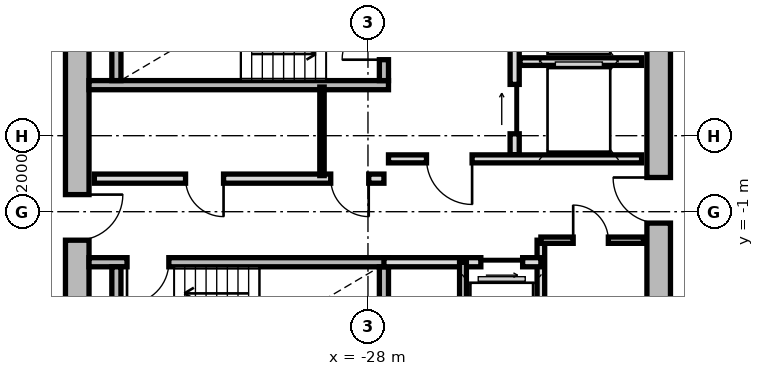
"""IFC4 building model, lengths in metres.
Left out: names, types, materials, properties, quantities, classifications, styles, units other than length and angle.
Written with IfcOpenShell. Run it as: python <this file> out.ifc"""

import sys

from ifc_helpers import new_model, si_unit, direction, frame, frame_2d, origin, place, context, subcontext, project, spatial, rectangle, extrude, source, transform, mapped, element, fill, save


model = new_model("IFC4")
c1 = context("Model", 3, precision=1e-05, world=origin(), true_north=direction((0.0, 1.0)))
c2 = subcontext(c1, "Body", "Model", "MODEL_VIEW")
j1 = project(units=[si_unit("LENGTHUNIT", "METRE"), si_unit("PLANEANGLEUNIT", "RADIAN")], contexts=[c1])
p1 = place(None, origin())
s1 = spatial("IfcSite", under=j1, at=p1, CompositionType="ELEMENT")
p2 = place(p1, origin())
s2 = spatial("IfcBuilding", under=s1, at=p2, CompositionType="ELEMENT")
p3 = place(p2, frame((0.0, 0.0, 158.7)))
s3 = spatial("IfcBuildingStorey", under=s2, at=p3, CompositionType="ELEMENT", Elevation=158.7)
m1 = source(origin(), c2, "Body", "SweptSolid", [
    extrude(rectangle(XDim=11.1, YDim=0.62, at=frame_2d((5.55, 0.0))), origin(), (0.0, 0.0, 1.0), 2.81),
])
p4 = place(p3, frame((-35.65, -5.55, 0.0), z_axis=(0.0, 0.0, 1.0), x_axis=(0.0, 1.0, 0.0)))
e1 = element("IfcWall", 1, at=p4, inside=s3, PredefinedType="SHEAR", context=c2, shape_type="MappedRepresentation", body=[
    mapped(m1, transform((0.0, 0.0, 0.0), x_axis=(1.0, 0.0, 0.0), y_axis=(0.0, 1.0, 0.0), z_axis=(0.0, 0.0, 1.0), scale=1.0)),
])
p5 = place(p4, frame((3.8, 0.0, 0.0)))
e2 = element("IfcOpeningElement", 2, at=p5, cuts=e1, PredefinedType="OPENING", context=c2, shape_type="SweptSolid", body=[
    extrude(rectangle(XDim=1.2, YDim=2.15, at=frame_2d((0.6, 1.075))), frame((0.0, 0.32, 0.0), z_axis=(0.0, -1.0, 0.0), x_axis=(1.0, 0.0, 0.0)), (0.0, 0.0, 1.0), 0.64),
])
p6 = place(p3, frame((-20.35, 5.55, 0.0), z_axis=(0.0, 0.0, 1.0), x_axis=(0.0, -1.0, 0.0)))
e3 = element("IfcWall", 3, at=p6, inside=s3, PredefinedType="SHEAR", context=c2, shape_type="MappedRepresentation", body=[
    mapped(m1, transform((0.0, 0.0, 0.0), x_axis=(1.0, 0.0, 0.0), y_axis=(0.0, 1.0, 0.0), z_axis=(0.0, 0.0, 1.0), scale=1.0)),
])
p7 = place(p6, frame((5.65, 0.0, 0.0)))
e4 = element("IfcOpeningElement", 4, at=p7, cuts=e3, PredefinedType="OPENING", context=c2, shape_type="SweptSolid", body=[
    extrude(rectangle(XDim=1.2, YDim=2.15, at=frame_2d((0.6, 1.075))), frame((0.0, 0.32, 0.0), z_axis=(0.0, -1.0, 0.0), x_axis=(1.0, 0.0, 0.0)), (0.0, 0.0, 1.0), 0.64),
])
m2 = source(origin(), c2, "Body", "SweptSolid", [
    extrude(rectangle(XDim=7.88, YDim=0.24, at=frame_2d((3.94, 0.0))), origin(), (0.0, 0.0, 1.0), 2.81),
])
p8 = place(p3, frame((-35.34, 2.33, 0.0), z_axis=(0.0, 0.0, 1.0), x_axis=(1.0, 0.0, 0.0)))
e5 = element("IfcWall", 5, at=p8, inside=s3, PredefinedType="PARTITIONING", context=c2, shape_type="MappedRepresentation", body=[
    mapped(m2, transform((0.0, 0.0, 0.0), x_axis=(1.0, 0.0, 0.0), y_axis=(0.0, 1.0, 0.0), z_axis=(0.0, 0.0, 1.0), scale=1.0)),
])
m3 = source(origin(), c2, "Body", "SweptSolid", [
    extrude(rectangle(XDim=3.19, YDim=0.24, at=frame_2d((1.595, 0.0))), origin(), (0.0, 0.0, 1.0), 2.81),
])
p9 = place(p3, frame((-34.62, 2.45, 0.0), z_axis=(0.0, 0.0, 1.0), x_axis=(0.0, 1.0, 0.0)))
e6 = element("IfcWall", 6, at=p9, inside=s3, PredefinedType="PARTITIONING", context=c2, shape_type="MappedRepresentation", body=[
    mapped(m3, transform((0.0, 0.0, 0.0), x_axis=(1.0, 0.0, 0.0), y_axis=(0.0, 1.0, 0.0), z_axis=(0.0, 0.0, 1.0), scale=1.0)),
])
p10 = place(p3, frame((-27.58, 2.45, 0.0), z_axis=(0.0, 0.0, 1.0), x_axis=(0.0, 1.0, 0.0)))
e7 = element("IfcWall", 7, at=p10, inside=s3, PredefinedType="PARTITIONING", context=c2, shape_type="MappedRepresentation", body=[
    mapped(m3, transform((0.0, 0.0, 0.0), x_axis=(1.0, 0.0, 0.0), y_axis=(0.0, 1.0, 0.0), z_axis=(0.0, 0.0, 1.0), scale=1.0)),
])
p11 = place(p10, frame((0.55, 0.0, 0.0)))
e8 = element("IfcOpeningElement", 8, at=p11, cuts=e7, PredefinedType="OPENING", context=c2, shape_type="SweptSolid", body=[
    extrude(rectangle(XDim=1.1, YDim=2.15, at=frame_2d((0.55, 1.075))), frame((0.0, 0.13, 0.0), z_axis=(0.0, -1.0, 0.0), x_axis=(1.0, 0.0, 0.0)), (0.0, 0.0, 1.0), 0.26),
])
p12 = place(p3, frame((-35.34, -2.33, 0.0), z_axis=(0.0, 0.0, 1.0), x_axis=(1.0, 0.0, 0.0)))
e9 = element("IfcWall", 9, at=p12, inside=s3, PredefinedType="PARTITIONING", context=c2, shape_type="MappedRepresentation", body=[
    mapped(m2, transform((0.0, 0.0, 0.0), x_axis=(1.0, 0.0, 0.0), y_axis=(0.0, 1.0, 0.0), z_axis=(0.0, 0.0, 1.0), scale=1.0)),
])
p13 = place(p12, frame((1.0, 0.0, 0.0)))
e10 = element("IfcOpeningElement", 10, at=p13, cuts=e9, PredefinedType="OPENING", context=c2, shape_type="SweptSolid", body=[
    extrude(rectangle(XDim=1.1, YDim=2.15, at=frame_2d((0.55, 1.075))), frame((0.0, 0.13, 0.0), z_axis=(0.0, -1.0, 0.0), x_axis=(1.0, 0.0, 0.0)), (0.0, 0.0, 1.0), 0.26),
])
for number, where, z_axis, x_axis in (
    (11, (-34.62, -5.64, 0.0), (0.0, 0.0, 1.0), (0.0, 1.0, 0.0)),
    (12, (-27.58, -5.64, 0.0), (0.0, 0.0, 1.0), (0.0, 1.0, 0.0)),
):
    element("IfcWall", number, at=place(p3, frame(where, z_axis=z_axis, x_axis=x_axis)), inside=s3, PredefinedType="PARTITIONING", context=c2, shape_type="MappedRepresentation", body=[
        mapped(m3, transform((0.0, 0.0, 0.0), x_axis=(1.0, 0.0, 0.0), y_axis=(0.0, 1.0, 0.0), z_axis=(0.0, 0.0, 1.0), scale=1.0)),
    ])
m4 = source(origin(), c2, "Body", "SweptSolid", [
    extrude(rectangle(XDim=5.0, YDim=0.24, at=frame_2d((2.5, 0.0))), origin(), (0.0, 0.0, 1.0), 2.795),
])
p14 = place(p3, frame((-24.14, 0.5, 0.0), z_axis=(0.0, 0.0, 1.0), x_axis=(0.0, 1.0, 0.0)))
e13 = element("IfcWall", 13, at=p14, inside=s3, PredefinedType="PARTITIONING", context=c2, shape_type="MappedRepresentation", body=[
    mapped(m4, transform((0.0, 0.0, 0.0), x_axis=(1.0, 0.0, 0.0), y_axis=(0.0, 1.0, 0.0), z_axis=(0.0, 0.0, 1.0), scale=1.0)),
])
p15 = place(p14, frame((3.05, 0.0, 0.0)))
e14 = element("IfcOpeningElement", 14, at=p15, cuts=e13, PredefinedType="OPENING", context=c2, shape_type="SweptSolid", body=[
    extrude(rectangle(XDim=1.3, YDim=2.2, at=frame_2d((0.65, 1.1))), frame((0.0, 0.13, 0.0), z_axis=(0.0, -1.0, 0.0), x_axis=(1.0, 0.0, 0.0)), (0.0, 0.0, 1.0), 0.26),
])
p16 = place(p14, frame((0.55, 0.0, 0.0)))
e15 = element("IfcOpeningElement", 15, at=p16, cuts=e13, PredefinedType="OPENING", context=c2, shape_type="SweptSolid", body=[
    extrude(rectangle(XDim=1.3, YDim=2.2, at=frame_2d((0.65, 1.1))), frame((0.0, 0.13, 0.0), z_axis=(0.0, -1.0, 0.0), x_axis=(1.0, 0.0, 0.0)), (0.0, 0.0, 1.0), 0.26),
])
m5 = source(origin(), c2, "Body", "SweptSolid", [
    extrude(rectangle(XDim=3.2, YDim=0.2, at=frame_2d((1.6, 0.0))), origin(), (0.0, 0.0, 1.0), 2.795),
])
p17 = place(p3, frame((-24.0, 2.95, 0.0), z_axis=(0.0, 0.0, 1.0), x_axis=(1.0, 0.0, 0.0)))
e16 = element("IfcWall", 16, at=p17, inside=s3, PredefinedType="PARTITIONING", context=c2, shape_type="MappedRepresentation", body=[
    mapped(m5, transform((0.0, 0.0, 0.0), x_axis=(1.0, 0.0, 0.0), y_axis=(0.0, 1.0, 0.0), z_axis=(0.0, 0.0, 1.0), scale=1.0)),
])
m6 = source(origin(), c2, "Body", "SweptSolid", [
    extrude(rectangle(XDim=6.66, YDim=0.21, at=frame_2d((3.33, 0.0))), origin(), (0.0, 0.0, 1.0), 2.795),
])
p18 = place(p3, frame((-27.46, 0.39, 0.0), z_axis=(0.0, 0.0, 1.0), x_axis=(1.0, 0.0, 0.0)))
e17 = element("IfcWall", 17, at=p18, inside=s3, PredefinedType="PARTITIONING", context=c2, shape_type="MappedRepresentation", body=[
    mapped(m6, transform((0.0, 0.0, 0.0), x_axis=(1.0, 0.0, 0.0), y_axis=(0.0, 1.0, 0.0), z_axis=(0.0, 0.0, 1.0), scale=1.0)),
])
p19 = place(p18, frame((1.0, 0.0, 0.0)))
e18 = element("IfcOpeningElement", 18, at=p19, cuts=e17, PredefinedType="OPENING", context=c2, shape_type="SweptSolid", body=[
    extrude(rectangle(XDim=1.2, YDim=2.15, at=frame_2d((0.6, 1.075))), frame((0.0, 0.115, 0.0), z_axis=(0.0, -1.0, 0.0), x_axis=(1.0, 0.0, 0.0)), (0.0, 0.0, 1.0), 0.23),
])
m7 = source(origin(), c2, "Body", "SweptSolid", [
    extrude(rectangle(XDim=7.62, YDim=0.24, at=frame_2d((3.81, 0.0))), origin(), (0.0, 0.0, 1.0), 2.795),
])
p20 = place(p3, frame((-35.2, -0.13, 0.0), z_axis=(0.0, 0.0, 1.0), x_axis=(1.0, 0.0, 0.0)))
e19 = element("IfcWall", 19, at=p20, inside=s3, PredefinedType="PARTITIONING", context=c2, shape_type="MappedRepresentation", body=[
    mapped(m7, transform((0.0, 0.0, 0.0), x_axis=(1.0, 0.0, 0.0), y_axis=(0.0, 1.0, 0.0), z_axis=(0.0, 0.0, 1.0), scale=1.0)),
])
p21 = place(p20, frame((6.22, 0.0, 0.0)))
e20 = element("IfcOpeningElement", 20, at=p21, cuts=e19, PredefinedType="OPENING", context=c2, shape_type="SweptSolid", body=[
    extrude(rectangle(XDim=1.0, YDim=2.1, at=frame_2d((0.5, 1.05))), frame((0.0, 0.13, 0.0), z_axis=(0.0, -1.0, 0.0), x_axis=(1.0, 0.0, 0.0)), (0.0, 0.0, 1.0), 0.26),
])
p22 = place(p20, frame((2.4, 0.0, 0.0)))
e21 = element("IfcOpeningElement", 21, at=p22, cuts=e19, PredefinedType="OPENING", context=c2, shape_type="SweptSolid", body=[
    extrude(rectangle(XDim=1.0, YDim=2.1, at=frame_2d((0.5, 1.05))), frame((0.0, 0.13, 0.0), z_axis=(0.0, -1.0, 0.0), x_axis=(1.0, 0.0, 0.0)), (0.0, 0.0, 1.0), 0.26),
])
m8 = source(origin(), c2, "Body", "SweptSolid", [
    extrude(rectangle(XDim=2.33, YDim=0.115, at=frame_2d((1.165, 0.0))), origin(), (0.0, 0.0, 1.0), 2.795),
])
p23 = place(p3, frame((-29.21, -0.05, 0.0), z_axis=(0.0, 0.0, 1.0), x_axis=(0.0, 1.0, 0.0)))
e22 = element("IfcWall", 22, at=p23, inside=s3, PredefinedType="PARTITIONING", context=c2, shape_type="MappedRepresentation", body=[
    mapped(m8, transform((0.0, 0.0, 0.0), x_axis=(1.0, 0.0, 0.0), y_axis=(0.0, 1.0, 0.0), z_axis=(0.0, 0.0, 1.0), scale=1.0)),
])
m9 = source(origin(), c2, "Body", "SweptSolid", [
    extrude(rectangle(XDim=3.8, YDim=0.2, at=frame_2d((1.9, 0.0))), origin(), (0.0, 0.0, 1.0), 2.795),
])
p24 = place(p3, frame((-23.45, -5.55, 0.0), z_axis=(0.0, 0.0, 1.0), x_axis=(0.0, 1.0, 0.0)))
e23 = element("IfcWall", 23, at=p24, inside=s3, PredefinedType="PARTITIONING", context=c2, shape_type="MappedRepresentation", body=[
    mapped(m9, transform((0.0, 0.0, 0.0), x_axis=(1.0, 0.0, 0.0), y_axis=(0.0, 1.0, 0.0), z_axis=(0.0, 0.0, 1.0), scale=1.0)),
])
m10 = source(origin(), c2, "Body", "SweptSolid", [
    extrude(rectangle(XDim=4.13, YDim=0.24, at=frame_2d((2.065, 0.0))), origin(), (0.0, 0.0, 1.0), 2.795),
])
p25 = place(p3, frame((-27.58, -2.33, 0.0), z_axis=(0.0, 0.0, 1.0), x_axis=(1.0, 0.0, 0.0)))
e24 = element("IfcWall", 24, at=p25, inside=s3, PredefinedType="PARTITIONING", context=c2, shape_type="MappedRepresentation", body=[
    mapped(m10, transform((0.0, 0.0, 0.0), x_axis=(1.0, 0.0, 0.0), y_axis=(0.0, 1.0, 0.0), z_axis=(0.0, 0.0, 1.0), scale=1.0)),
])
p26 = place(p25, frame((2.55, 0.0, 0.0)))
e25 = element("IfcOpeningElement", 25, at=p26, cuts=e24, PredefinedType="OPENING", context=c2, shape_type="SweptSolid", body=[
    extrude(rectangle(XDim=1.1, YDim=2.2, at=frame_2d((0.55, 1.1))), frame((0.0, 0.13, 0.0), z_axis=(0.0, -1.0, 0.0), x_axis=(1.0, 0.0, 0.0)), (0.0, 0.0, 1.0), 0.26),
])
m11 = source(origin(), c2, "Body", "SweptSolid", [
    extrude(rectangle(XDim=3.22, YDim=0.18, at=frame_2d((1.61, 0.0))), origin(), (0.0, 0.0, 1.0), 2.795),
])
p27 = place(p3, frame((-25.5, -5.55, 0.0), z_axis=(0.0, 0.0, 1.0), x_axis=(0.0, 1.0, 0.0)))
e26 = element("IfcWall", 26, at=p27, inside=s3, PredefinedType="PARTITIONING", context=c2, shape_type="MappedRepresentation", body=[
    mapped(m11, transform((0.0, 0.0, 0.0), x_axis=(1.0, 0.0, 0.0), y_axis=(0.0, 1.0, 0.0), z_axis=(0.0, 0.0, 1.0), scale=1.0)),
])
m12 = source(origin(), c2, "Body", "SweptSolid", [
    extrude(rectangle(XDim=2.7, YDim=0.165, at=frame_2d((1.35, 0.0))), origin(), (0.0, 0.0, 1.0), 2.795),
])
p28 = place(p3, frame((-23.45, -1.75, 0.0), z_axis=(0.0, 0.0, 1.0), x_axis=(1.0, 0.0, 0.0)))
e27 = element("IfcWall", 27, at=p28, inside=s3, PredefinedType="PARTITIONING", context=c2, shape_type="MappedRepresentation", body=[
    mapped(m12, transform((0.0, 0.0, 0.0), x_axis=(1.0, 0.0, 0.0), y_axis=(0.0, 1.0, 0.0), z_axis=(0.0, 0.0, 1.0), scale=1.0)),
])
p29 = place(p28, frame((0.85, 0.0, 0.0)))
e28 = element("IfcOpeningElement", 28, at=p29, cuts=e27, PredefinedType="OPENING", context=c2, shape_type="SweptSolid", body=[
    extrude(rectangle(XDim=0.925, YDim=2.1, at=frame_2d((0.462, 1.05))), frame((0.0, 0.093, 0.0), z_axis=(0.0, -1.0, 0.0), x_axis=(1.0, 0.0, 0.0)), (0.0, 0.0, 1.0), 0.185),
])
m13 = source(origin(), c2, "Body", "SweptSolid", [
    extrude(rectangle(XDim=1.1, YDim=2.15, at=frame_2d((0.55, 1.075))), frame((0.0, 0.025, 0.0), z_axis=(0.0, -1.0, 0.0), x_axis=(1.0, 0.0, 0.0)), (0.0, 0.0, 1.0), 0.05),
])
p30 = place(p11, origin())
e29 = element("IfcDoor", 29, at=p30, inside=s3, OperationType="SINGLE_SWING_LEFT", PredefinedType="DOOR", context=c2, shape_type="MappedRepresentation", body=[
    mapped(m13, transform((0.0, 0.0, 0.0), x_axis=(1.0, 0.0, 0.0), y_axis=(0.0, 1.0, 0.0), z_axis=(0.0, 0.0, 1.0), scale=1.0)),
])
fill(e8, e29)
p31 = place(p13, frame((1.1, 0.0, 0.0), z_axis=(0.0, 0.0, 1.0), x_axis=(-1.0, 0.0, 0.0)))
e30 = element("IfcDoor", 30, at=p31, inside=s3, OperationType="SINGLE_SWING_RIGHT", PredefinedType="DOOR", context=c2, shape_type="MappedRepresentation", body=[
    mapped(m13, transform((0.0, 0.0, 0.0), x_axis=(1.0, 0.0, 0.0), y_axis=(0.0, 1.0, 0.0), z_axis=(0.0, 0.0, 1.0), scale=1.0)),
])
fill(e10, e30)
m14 = source(origin(), c2, "Body", "SweptSolid", [
    extrude(rectangle(XDim=1.3, YDim=2.2, at=frame_2d((0.65, 1.1))), frame((0.0, 0.025, 0.0), z_axis=(0.0, -1.0, 0.0), x_axis=(1.0, 0.0, 0.0)), (0.0, 0.0, 1.0), 0.05),
])
p32 = place(p16, origin())
e31 = element("IfcDoor", 31, at=p32, inside=s3, OperationType="SLIDING_TO_RIGHT", PredefinedType="DOOR", context=c2, shape_type="MappedRepresentation", body=[
    mapped(m14, transform((0.0, 0.0, 0.0), x_axis=(1.0, 0.0, 0.0), y_axis=(0.0, 1.0, 0.0), z_axis=(0.0, 0.0, 1.0), scale=1.0)),
])
fill(e15, e31)
m15 = source(origin(), c2, "Body", "SweptSolid", [
    extrude(rectangle(XDim=1.2, YDim=2.15, at=frame_2d((0.6, 1.075))), frame((0.0, 0.025, 0.0), z_axis=(0.0, -1.0, 0.0), x_axis=(1.0, 0.0, 0.0)), (0.0, 0.0, 1.0), 0.05),
])
p33 = place(p19, frame((1.2, 0.0, 0.0), z_axis=(0.0, 0.0, 1.0), x_axis=(-1.0, 0.0, 0.0)))
e32 = element("IfcDoor", 32, at=p33, inside=s3, OperationType="SINGLE_SWING_LEFT", PredefinedType="DOOR", context=c2, shape_type="MappedRepresentation", body=[
    mapped(m15, transform((0.0, 0.0, 0.0), x_axis=(1.0, 0.0, 0.0), y_axis=(0.0, 1.0, 0.0), z_axis=(0.0, 0.0, 1.0), scale=1.0)),
])
fill(e18, e32)
p34 = place(p5, frame((1.2, 0.0, 0.0), z_axis=(0.0, 0.0, 1.0), x_axis=(-1.0, 0.0, 0.0)))
e33 = element("IfcDoor", 33, at=p34, inside=s3, OperationType="SINGLE_SWING_LEFT", PredefinedType="DOOR", context=c2, shape_type="MappedRepresentation", body=[
    mapped(m15, transform((0.0, 0.0, 0.0), x_axis=(1.0, 0.0, 0.0), y_axis=(0.0, 1.0, 0.0), z_axis=(0.0, 0.0, 1.0), scale=1.0)),
])
fill(e2, e33)
p35 = place(p7, frame((1.2, 0.0, 0.0), z_axis=(0.0, 0.0, 1.0), x_axis=(-1.0, 0.0, 0.0)))
e34 = element("IfcDoor", 34, at=p35, inside=s3, OperationType="SINGLE_SWING_RIGHT", PredefinedType="DOOR", context=c2, shape_type="MappedRepresentation", body=[
    mapped(m15, transform((0.0, 0.0, 0.0), x_axis=(1.0, 0.0, 0.0), y_axis=(0.0, 1.0, 0.0), z_axis=(0.0, 0.0, 1.0), scale=1.0)),
])
fill(e4, e34)
m16 = source(origin(), c2, "Body", "SweptSolid", [
    extrude(rectangle(XDim=1.0, YDim=2.1, at=frame_2d((0.5, 1.05))), frame((0.0, 0.025, 0.0), z_axis=(0.0, -1.0, 0.0), x_axis=(1.0, 0.0, 0.0)), (0.0, 0.0, 1.0), 0.05),
])
p36 = place(p21, frame((1.0, 0.0, 0.0), z_axis=(0.0, 0.0, 1.0), x_axis=(-1.0, 0.0, 0.0)))
e35 = element("IfcDoor", 35, at=p36, inside=s3, OperationType="SINGLE_SWING_LEFT", PredefinedType="DOOR", context=c2, shape_type="MappedRepresentation", body=[
    mapped(m16, transform((0.0, 0.0, 0.0), x_axis=(1.0, 0.0, 0.0), y_axis=(0.0, 1.0, 0.0), z_axis=(0.0, 0.0, 1.0), scale=1.0)),
])
fill(e20, e35)
p37 = place(p22, frame((1.0, 0.0, 0.0), z_axis=(0.0, 0.0, 1.0), x_axis=(-1.0, 0.0, 0.0)))
e36 = element("IfcDoor", 36, at=p37, inside=s3, OperationType="SINGLE_SWING_LEFT", PredefinedType="DOOR", context=c2, shape_type="MappedRepresentation", body=[
    mapped(m16, transform((0.0, 0.0, 0.0), x_axis=(1.0, 0.0, 0.0), y_axis=(0.0, 1.0, 0.0), z_axis=(0.0, 0.0, 1.0), scale=1.0)),
])
fill(e21, e36)
m17 = source(origin(), c2, "Body", "SweptSolid", [
    extrude(rectangle(XDim=1.1, YDim=2.2, at=frame_2d((0.55, 1.1))), frame((0.0, 0.025, 0.0), z_axis=(0.0, -1.0, 0.0), x_axis=(1.0, 0.0, 0.0)), (0.0, 0.0, 1.0), 0.05),
])
p38 = place(p26, frame((1.1, 0.0, 0.0), z_axis=(0.0, 0.0, 1.0), x_axis=(-1.0, 0.0, 0.0)))
e37 = element("IfcDoor", 37, at=p38, inside=s3, OperationType="SLIDING_TO_RIGHT", PredefinedType="DOOR", context=c2, shape_type="MappedRepresentation", body=[
    mapped(m17, transform((0.0, 0.0, 0.0), x_axis=(1.0, 0.0, 0.0), y_axis=(0.0, 1.0, 0.0), z_axis=(0.0, 0.0, 1.0), scale=1.0)),
])
fill(e25, e37)
m18 = source(origin(), c2, "Body", "SweptSolid", [
    extrude(rectangle(XDim=0.925, YDim=2.1, at=frame_2d((0.462, 1.05))), frame((0.0, 0.025, 0.0), z_axis=(0.0, -1.0, 0.0), x_axis=(1.0, 0.0, 0.0)), (0.0, 0.0, 1.0), 0.05),
])
p39 = place(p29, origin())
e38 = element("IfcDoor", 38, at=p39, inside=s3, OperationType="SINGLE_SWING_LEFT", PredefinedType="DOOR", context=c2, shape_type="MappedRepresentation", body=[
    mapped(m18, transform((0.0, 0.0, 0.0), x_axis=(1.0, 0.0, 0.0), y_axis=(0.0, 1.0, 0.0), z_axis=(0.0, 0.0, 1.0), scale=1.0)),
])
fill(e28, e38)
save(model, sys.argv[1])
